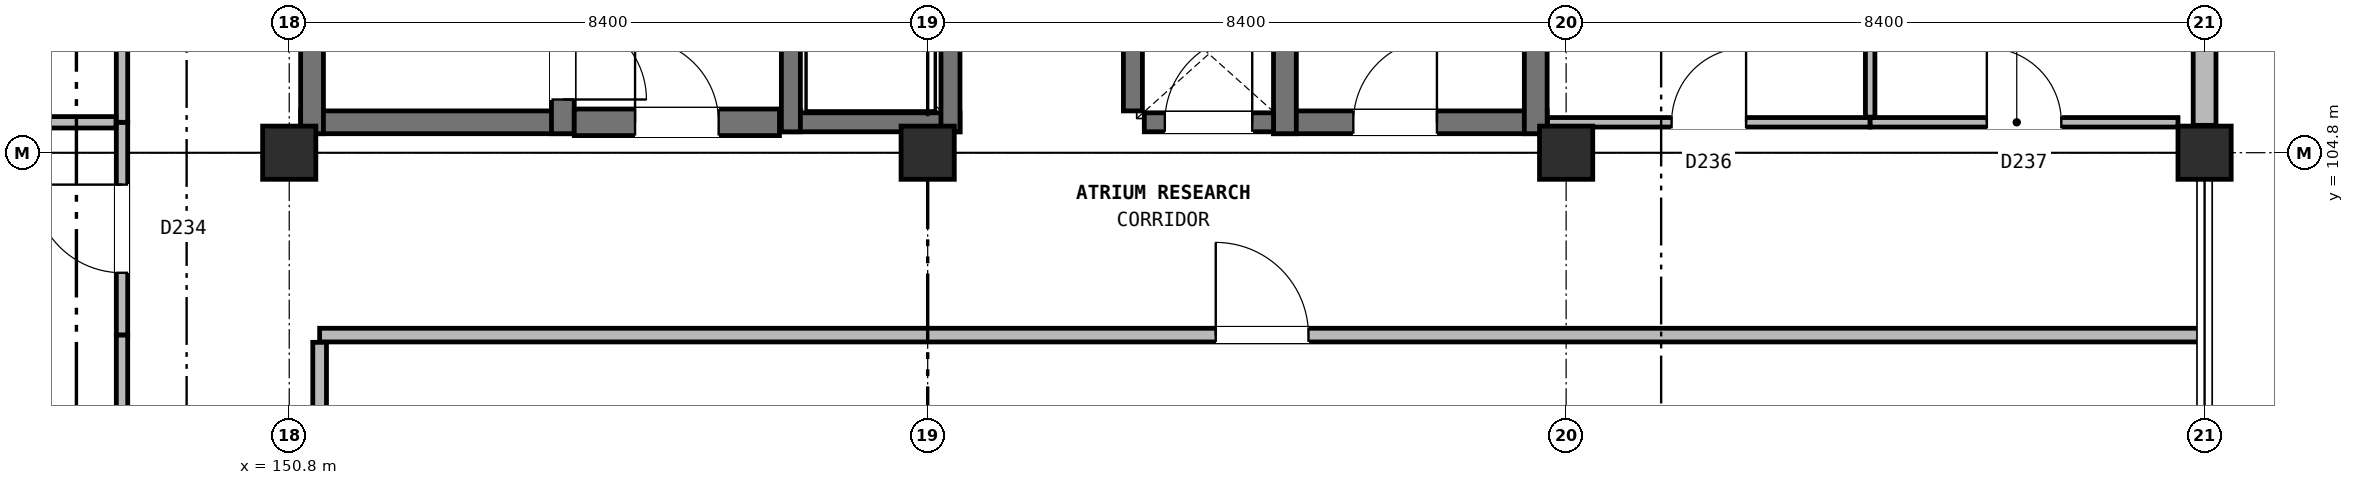
"""IFC4 building model, lengths in metres.
Left out: names, types, materials, properties, quantities, classifications, styles, units other than length and angle.
Written with IfcOpenShell. Run it as: python <this file> out.ifc"""

import sys

from ifc_helpers import new_model, si_unit, direction, frame, frame_2d, origin, origin_2d, place, context, subcontext, project, spatial, rectangle, extrude, element, fill, save


model = new_model("IFC4")
c1 = context("Model", 3, precision=1e-05, world=origin(), true_north=direction((0.0, 1.0)))
c2 = subcontext(c1, "Body", "Model", "MODEL_VIEW")
j1 = project(units=[si_unit("LENGTHUNIT", "METRE"), si_unit("PLANEANGLEUNIT", "RADIAN")], contexts=[c1])
p1 = place(None, origin())
s1 = spatial("IfcSite", under=j1, at=p1, CompositionType="ELEMENT")
p2 = place(p1, origin())
s2 = spatial("IfcBuilding", under=s1, at=p2, CompositionType="ELEMENT")
p3 = place(p2, frame((0.0, 0.0, 36.8)))
s3 = spatial("IfcBuildingStorey", under=s2, at=p3, CompositionType="ELEMENT", Elevation=36.8)
for number, where, z_axis, x_axis in (
    (1, (150.8, 104.8, 0.0), (0.0, 0.0, 1.0), (1.0, 0.0, 0.0)),
    (2, (159.2, 104.8, 0.0), (0.0, 0.0, 1.0), (1.0, 0.0, 0.0)),
    (3, (167.6, 104.8, 0.0), (0.0, 0.0, 1.0), (1.0, 0.0, 0.0)),
    (4, (176.0, 104.8, 0.0), (0.0, 0.0, 1.0), (1.0, 0.0, 0.0)),
):
    element("IfcColumn", number, at=place(p3, frame(where, z_axis=z_axis, x_axis=x_axis)), inside=s3, PredefinedType="COLUMN", context=c2, shape_type="SweptSolid", body=[
        extrude(rectangle(XDim=0.7, YDim=0.7, at=origin_2d()), origin(), (0.0, 0.0, 1.0), 3.8),
    ])
p4 = place(p3, frame((176.0, 105.16, 0.0), z_axis=(0.0, 0.0, 1.0), x_axis=(0.0, 1.0, 0.0)))
e5 = element("IfcWall", 5, at=p4, inside=s3, PredefinedType="SOLIDWALL", context=c2, shape_type="SweptSolid", body=[
    extrude(rectangle(XDim=8.08, YDim=0.3, at=frame_2d((4.04, 0.0))), origin(), (0.0, 0.0, 1.0), 3.05),
])
p5 = place(p4, frame((2.76, 0.0, 0.9)))
e6 = element("IfcOpeningElement", 6, at=p5, cuts=e5, PredefinedType="OPENING", context=c2, shape_type="SweptSolid", body=[
    extrude(rectangle(XDim=2.6, YDim=2.0, at=frame_2d((1.3, 1.0))), frame((0.0, 0.16, 0.0), z_axis=(0.0, -1.0, 0.0), x_axis=(1.0, 0.0, 0.0)), (0.0, 0.0, 1.0), 0.32),
])
p6 = place(p3, frame((150.95, 105.2, 0.0), z_axis=(0.0, 0.0, 1.0), x_axis=(1.0, 0.0, 0.0)))
e7 = element("IfcWall", 7, at=p6, inside=s3, PredefinedType="SHEAR", context=c2, shape_type="SweptSolid", body=[
    extrude(rectangle(XDim=3.6, YDim=0.3, at=frame_2d((1.8, 0.0))), origin(), (0.0, 0.0, 1.0), 3.8),
])
p7 = place(p3, frame((151.1, 105.05, 0.0), z_axis=(0.0, 0.0, 1.0), x_axis=(0.0, 1.0, 0.0)))
e8 = element("IfcWall", 8, at=p7, inside=s3, PredefinedType="SHEAR", context=c2, shape_type="SweptSolid", body=[
    extrude(rectangle(XDim=8.3, YDim=0.3, at=frame_2d((4.15, 0.0))), origin(), (0.0, 0.0, 1.0), 3.8),
])
p8 = place(p3, frame((154.4, 105.05, 0.0), z_axis=(0.0, 0.0, 1.0), x_axis=(0.0, 1.0, 0.0)))
e9 = element("IfcWall", 9, at=p8, inside=s3, PredefinedType="SHEAR", context=c2, shape_type="SweptSolid", body=[
    extrude(rectangle(XDim=8.3, YDim=0.3, at=frame_2d((4.15, 0.0))), origin(), (0.0, 0.0, 1.0), 3.8),
])
p9 = place(p8, frame((0.45, 0.0, 0.0)))
e10 = element("IfcOpeningElement", 10, at=p9, cuts=e9, PredefinedType="OPENING", context=c2, shape_type="SweptSolid", body=[
    extrude(rectangle(XDim=1.1, YDim=2.2, at=frame_2d((0.55, 1.1))), frame((0.0, 0.16, 0.0), z_axis=(0.0, -1.0, 0.0), x_axis=(1.0, 0.0, 0.0)), (0.0, 0.0, 1.0), 0.32),
])
p10 = place(p3, frame((163.75, 105.2, 0.0), z_axis=(0.0, 0.0, 1.0), x_axis=(1.0, 0.0, 0.0)))
e11 = element("IfcWall", 11, at=p10, inside=s3, PredefinedType="SHEAR", context=c2, shape_type="SweptSolid", body=[
    extrude(rectangle(XDim=3.6, YDim=0.3, at=frame_2d((1.8, 0.0))), origin(), (0.0, 0.0, 1.0), 3.8),
])
p11 = place(p10, frame((1.05, 0.0, 0.0)))
e12 = element("IfcOpeningElement", 12, at=p11, cuts=e11, PredefinedType="OPENING", context=c2, shape_type="SweptSolid", body=[
    extrude(rectangle(XDim=1.1, YDim=2.2, at=frame_2d((0.55, 1.1))), frame((0.0, 0.16, 0.0), z_axis=(0.0, -1.0, 0.0), x_axis=(1.0, 0.0, 0.0)), (0.0, 0.0, 1.0), 0.32),
])
for number, where, z_axis, x_axis in (
    (13, (163.9, 105.05, 0.0), (0.0, 0.0, 1.0), (0.0, 1.0, 0.0)),
    (14, (167.2, 105.05, 0.0), (0.0, 0.0, 1.0), (0.0, 1.0, 0.0)),
):
    element("IfcWall", number, at=place(p3, frame(where, z_axis=z_axis, x_axis=x_axis)), inside=s3, PredefinedType="SHEAR", context=c2, shape_type="SweptSolid", body=[
        extrude(rectangle(XDim=8.3, YDim=0.3, at=frame_2d((4.15, 0.0))), origin(), (0.0, 0.0, 1.0), 3.8),
    ])
p12 = place(p3, frame((157.275, 105.2, 0.0), z_axis=(0.0, 0.0, 1.0), x_axis=(1.0, 0.0, 0.0)))
e15 = element("IfcWall", 15, at=p12, inside=s3, PredefinedType="SOLIDWALL", context=c2, shape_type="SweptSolid", body=[
    extrude(rectangle(XDim=2.35, YDim=0.25, at=frame_2d((1.175, 0.0))), origin(), (0.0, 0.0, 1.0), 3.48),
])
for number, where, z_axis, x_axis in (
    (16, (157.4, 105.075, 0.0), (0.0, 0.0, 1.0), (0.0, 1.0, 0.0)),
    (17, (159.5, 105.075, 0.0), (0.0, 0.0, 1.0), (0.0, 1.0, 0.0)),
):
    element("IfcWall", number, at=place(p3, frame(where, z_axis=z_axis, x_axis=x_axis)), inside=s3, PredefinedType="SOLIDWALL", context=c2, shape_type="SweptSolid", body=[
        extrude(rectangle(XDim=2.65, YDim=0.25, at=frame_2d((1.325, 0.0))), origin(), (0.0, 0.0, 1.0), 3.48),
    ])
p13 = place(p3, frame((154.55, 105.2, 0.0), z_axis=(0.0, 0.0, 1.0), x_axis=(1.0, 0.0, 0.0)))
e18 = element("IfcWall", 18, at=p13, inside=s3, PredefinedType="SHEAR", context=c2, shape_type="SweptSolid", body=[
    extrude(rectangle(XDim=2.7, YDim=0.35, at=frame_2d((1.35, 0.0))), origin(), (0.0, 0.0, 1.0), 3.48),
])
p14 = place(p13, frame((0.8, 0.0, 0.0)))
e19 = element("IfcOpeningElement", 19, at=p14, cuts=e18, PredefinedType="OPENING", context=c2, shape_type="SweptSolid", body=[
    extrude(rectangle(XDim=1.1, YDim=2.2, at=frame_2d((0.55, 1.1))), frame((0.0, 0.185, 0.0), z_axis=(0.0, -1.0, 0.0), x_axis=(1.0, 0.0, 0.0)), (0.0, 0.0, 1.0), 0.37),
])
p15 = place(p3, frame((161.9, 105.35, 0.0), z_axis=(0.0, 0.0, 1.0), x_axis=(0.0, 1.0, 0.0)))
e20 = element("IfcWall", 20, at=p15, inside=s3, PredefinedType="SOLIDWALL", context=c2, shape_type="SweptSolid", body=[
    extrude(rectangle(XDim=1.5, YDim=0.25, at=frame_2d((0.75, 0.0))), origin(), (0.0, 0.0, 1.0), 3.48),
])
p16 = place(p3, frame((162.05, 105.2, 0.0), z_axis=(0.0, 0.0, 1.0), x_axis=(1.0, 0.0, 0.0)))
e21 = element("IfcWall", 21, at=p16, inside=s3, PredefinedType="SOLIDWALL", context=c2, shape_type="SweptSolid", body=[
    extrude(rectangle(XDim=1.7, YDim=0.25, at=frame_2d((0.85, 0.0))), origin(), (0.0, 0.0, 1.0), 3.48),
])
p17 = place(p16, frame((0.27, 0.0, 0.0)))
e22 = element("IfcOpeningElement", 22, at=p17, cuts=e21, PredefinedType="OPENING", context=c2, shape_type="SweptSolid", body=[
    extrude(rectangle(XDim=1.15, YDim=2.2, at=frame_2d((0.575, 1.1))), frame((0.0, 0.135, 0.0), z_axis=(0.0, -1.0, 0.0), x_axis=(1.0, 0.0, 0.0)), (0.0, 0.0, 1.0), 0.27),
])
p18 = place(p3, frame((148.6, 102.4, 0.0), z_axis=(0.0, 0.0, 1.0), x_axis=(0.0, 1.0, 0.0)))
e23 = element("IfcWall", 23, at=p18, inside=s3, PredefinedType="PARTITIONING", context=c2, shape_type="SweptSolid", body=[
    extrude(rectangle(XDim=2.8, YDim=0.15, at=frame_2d((1.4, 0.0))), origin(), (0.0, 0.0, 1.0), 3.465),
])
p19 = place(p18, frame((0.82, 0.0, 0.0)))
e24 = element("IfcOpeningElement", 24, at=p19, cuts=e23, PredefinedType="OPENING", context=c2, shape_type="SweptSolid", body=[
    extrude(rectangle(XDim=1.16, YDim=2.2, at=frame_2d((0.58, 1.1))), frame((0.0, 0.085, 0.0), z_axis=(0.0, -1.0, 0.0), x_axis=(1.0, 0.0, 0.0)), (0.0, 0.0, 1.0), 0.17),
])
p20 = place(p3, frame((151.2, 102.4, 0.0), z_axis=(0.0, 0.0, 1.0), x_axis=(1.0, 0.0, 0.0)))
e25 = element("IfcWall", 25, at=p20, inside=s3, PredefinedType="PARTITIONING", context=c2, shape_type="SweptSolid", body=[
    extrude(rectangle(XDim=24.8, YDim=0.18, at=frame_2d((12.4, 0.0))), origin(), (0.0, 0.0, 1.0), 3.465),
])
p21 = place(p20, frame((11.79, 0.0, 0.0)))
e26 = element("IfcOpeningElement", 26, at=p21, cuts=e25, PredefinedType="OPENING", context=c2, shape_type="SweptSolid", body=[
    extrude(rectangle(XDim=1.22, YDim=2.2, at=frame_2d((0.61, 1.1))), frame((0.0, 0.1, 0.0), z_axis=(0.0, -1.0, 0.0), x_axis=(1.0, 0.0, 0.0)), (0.0, 0.0, 1.0), 0.2),
])
p22 = place(p3, frame((167.355, 105.2, 0.0), z_axis=(0.0, 0.0, 1.0), x_axis=(1.0, 0.0, 0.0)))
e27 = element("IfcWall", 27, at=p22, inside=s3, PredefinedType="PARTITIONING", context=c2, shape_type="SweptSolid", body=[
    extrude(rectangle(XDim=4.245, YDim=0.125, at=frame_2d((2.123, 0.0))), origin(), (0.0, 0.0, 1.0), 3.045),
])
p23 = place(p22, frame((1.633, 0.0, 0.0)))
e28 = element("IfcOpeningElement", 28, at=p23, cuts=e27, PredefinedType="OPENING", context=c2, shape_type="SweptSolid", body=[
    extrude(rectangle(XDim=0.98, YDim=2.1, at=frame_2d((0.49, 1.05))), frame((0.0, 0.073, 0.0), z_axis=(0.0, -1.0, 0.0), x_axis=(1.0, 0.0, 0.0)), (0.0, 0.0, 1.0), 0.145),
])
p24 = place(p3, frame((171.6, 105.2, 0.0), z_axis=(0.0, 0.0, 1.0), x_axis=(1.0, 0.0, 0.0)))
e29 = element("IfcWall", 29, at=p24, inside=s3, PredefinedType="PARTITIONING", context=c2, shape_type="SweptSolid", body=[
    extrude(rectangle(XDim=4.05, YDim=0.125, at=frame_2d((2.025, 0.0))), origin(), (0.0, 0.0, 1.0), 3.045),
])
p25 = place(p24, frame((1.535, 0.0, 0.0)))
e30 = element("IfcOpeningElement", 30, at=p25, cuts=e29, PredefinedType="OPENING", context=c2, shape_type="SweptSolid", body=[
    extrude(rectangle(XDim=0.98, YDim=2.1, at=frame_2d((0.49, 1.05))), frame((0.0, 0.073, 0.0), z_axis=(0.0, -1.0, 0.0), x_axis=(1.0, 0.0, 0.0)), (0.0, 0.0, 1.0), 0.145),
])
p26 = place(p3, frame((148.6, 96.28, 0.0), z_axis=(0.0, 0.0, 1.0), x_axis=(0.0, 1.0, 0.0)))
e31 = element("IfcWall", 31, at=p26, inside=s3, PredefinedType="PARTITIONING", context=c2, shape_type="SweptSolid", body=[
    extrude(rectangle(XDim=6.12, YDim=0.15, at=frame_2d((3.06, 0.0))), origin(), (0.0, 0.0, 1.0), 3.465),
])
p27 = place(p3, frame((151.2, 94.8, 0.0), z_axis=(0.0, 0.0, 1.0), x_axis=(0.0, 1.0, 0.0)))
e32 = element("IfcWall", 32, at=p27, inside=s3, PredefinedType="PARTITIONING", context=c2, shape_type="SweptSolid", body=[
    extrude(rectangle(XDim=7.505, YDim=0.18, at=frame_2d((3.752, 0.0))), origin(), (0.0, 0.0, 1.0), 3.045),
])
p28 = place(p3, frame((148.6, 105.2, 0.0), z_axis=(0.0, 0.0, 1.0), x_axis=(0.0, 1.0, 0.0)))
e33 = element("IfcWall", 33, at=p28, inside=s3, PredefinedType="PARTITIONING", context=c2, shape_type="SweptSolid", body=[
    extrude(rectangle(XDim=14.2, YDim=0.15, at=frame_2d((7.1, 0.0))), origin(), (0.0, 0.0, 1.0), 3.465),
])
p29 = place(p28, frame((6.65, 0.0, 0.0)))
e34 = element("IfcOpeningElement", 34, at=p29, cuts=e33, PredefinedType="OPENING", context=c2, shape_type="SweptSolid", body=[
    extrude(rectangle(XDim=0.9, YDim=2.12, at=frame_2d((0.45, 1.06))), frame((0.0, 0.085, 0.0), z_axis=(0.0, -1.0, 0.0), x_axis=(1.0, 0.0, 0.0)), (0.0, 0.0, 1.0), 0.17),
])
p30 = place(p3, frame((134.35, 105.2, 0.0), z_axis=(0.0, 0.0, 1.0), x_axis=(1.0, 0.0, 0.0)))
e35 = element("IfcWall", 35, at=p30, inside=s3, PredefinedType="PARTITIONING", context=c2, shape_type="SweptSolid", body=[
    extrude(rectangle(XDim=14.17, YDim=0.15, at=frame_2d((7.085, 0.0))), origin(), (0.0, 0.0, 1.0), 3.045),
])
p31 = place(p3, frame((171.6, 105.268, 0.0), z_axis=(0.0, 0.0, 1.0), x_axis=(0.0, 1.0, 0.0)))
e36 = element("IfcWall", 36, at=p31, inside=s3, PredefinedType="PARTITIONING", context=c2, shape_type="SweptSolid", body=[
    extrude(rectangle(XDim=16.978, YDim=0.125, at=frame_2d((8.489, 0.0))), origin(), (0.0, 0.0, 1.0), 3.465),
])
p32 = place(p9, frame((1.1, 0.0, 0.0), z_axis=(0.0, 0.0, 1.0), x_axis=(-1.0, 0.0, 0.0)))
e37 = element("IfcDoor", 37, at=p32, inside=s3, OperationType="SINGLE_SWING_LEFT", PredefinedType="DOOR", context=c2, shape_type="SweptSolid", body=[
    extrude(rectangle(XDim=1.1, YDim=2.2, at=frame_2d((0.55, 1.1))), frame((0.0, 0.025, 0.0), z_axis=(0.0, -1.0, 0.0), x_axis=(1.0, 0.0, 0.0)), (0.0, 0.0, 1.0), 0.05),
])
fill(e10, e37)
p33 = place(p11, origin())
e38 = element("IfcDoor", 38, at=p33, inside=s3, OperationType="SINGLE_SWING_RIGHT", PredefinedType="DOOR", context=c2, shape_type="SweptSolid", body=[
    extrude(rectangle(XDim=1.1, YDim=2.2, at=frame_2d((0.55, 1.1))), frame((0.0, 0.025, 0.0), z_axis=(0.0, -1.0, 0.0), x_axis=(1.0, 0.0, 0.0)), (0.0, 0.0, 1.0), 0.05),
])
fill(e12, e38)
p34 = place(p14, origin())
e39 = element("IfcDoor", 39, at=p34, inside=s3, OperationType="SINGLE_SWING_LEFT", PredefinedType="DOOR", context=c2, shape_type="SweptSolid", body=[
    extrude(rectangle(XDim=1.1, YDim=2.2, at=frame_2d((0.55, 1.1))), frame((0.0, 0.025, 0.0), z_axis=(0.0, -1.0, 0.0), x_axis=(1.0, 0.0, 0.0)), (0.0, 0.0, 1.0), 0.05),
])
fill(e19, e39)
p35 = place(p17, origin())
e40 = element("IfcDoor", 40, at=p35, inside=s3, OperationType="SINGLE_SWING_RIGHT", PredefinedType="DOOR", context=c2, shape_type="SweptSolid", body=[
    extrude(rectangle(XDim=1.15, YDim=2.2, at=frame_2d((0.575, 1.1))), frame((0.0, 0.025, 0.0), z_axis=(0.0, -1.0, 0.0), x_axis=(1.0, 0.0, 0.0)), (0.0, 0.0, 1.0), 0.05),
])
fill(e22, e40)
p36 = place(p19, origin())
e41 = element("IfcDoor", 41, at=p36, inside=s3, OperationType="SINGLE_SWING_RIGHT", PredefinedType="DOOR", context=c2, shape_type="SweptSolid", body=[
    extrude(rectangle(XDim=1.16, YDim=2.2, at=frame_2d((0.58, 1.1))), frame((0.0, 0.025, 0.0), z_axis=(0.0, -1.0, 0.0), x_axis=(1.0, 0.0, 0.0)), (0.0, 0.0, 1.0), 0.05),
])
fill(e24, e41)
p37 = place(p21, origin())
e42 = element("IfcDoor", 42, at=p37, inside=s3, OperationType="SINGLE_SWING_LEFT", PredefinedType="DOOR", context=c2, shape_type="SweptSolid", body=[
    extrude(rectangle(XDim=1.22, YDim=2.2, at=frame_2d((0.61, 1.1))), frame((0.0, 0.025, 0.0), z_axis=(0.0, -1.0, 0.0), x_axis=(1.0, 0.0, 0.0)), (0.0, 0.0, 1.0), 0.05),
])
fill(e26, e42)
p38 = place(p23, origin())
e43 = element("IfcDoor", 43, at=p38, inside=s3, OperationType="SINGLE_SWING_RIGHT", PredefinedType="DOOR", context=c2, shape_type="SweptSolid", body=[
    extrude(rectangle(XDim=0.98, YDim=2.1, at=frame_2d((0.49, 1.05))), frame((0.0, 0.025, 0.0), z_axis=(0.0, -1.0, 0.0), x_axis=(1.0, 0.0, 0.0)), (0.0, 0.0, 1.0), 0.05),
])
fill(e28, e43)
p39 = place(p25, origin())
e44 = element("IfcDoor", 44, at=p39, inside=s3, OperationType="SINGLE_SWING_LEFT", PredefinedType="DOOR", context=c2, shape_type="SweptSolid", body=[
    extrude(rectangle(XDim=0.98, YDim=2.1, at=frame_2d((0.49, 1.05))), frame((0.0, 0.025, 0.0), z_axis=(0.0, -1.0, 0.0), x_axis=(1.0, 0.0, 0.0)), (0.0, 0.0, 1.0), 0.05),
])
fill(e30, e44)
save(model, sys.argv[1])
